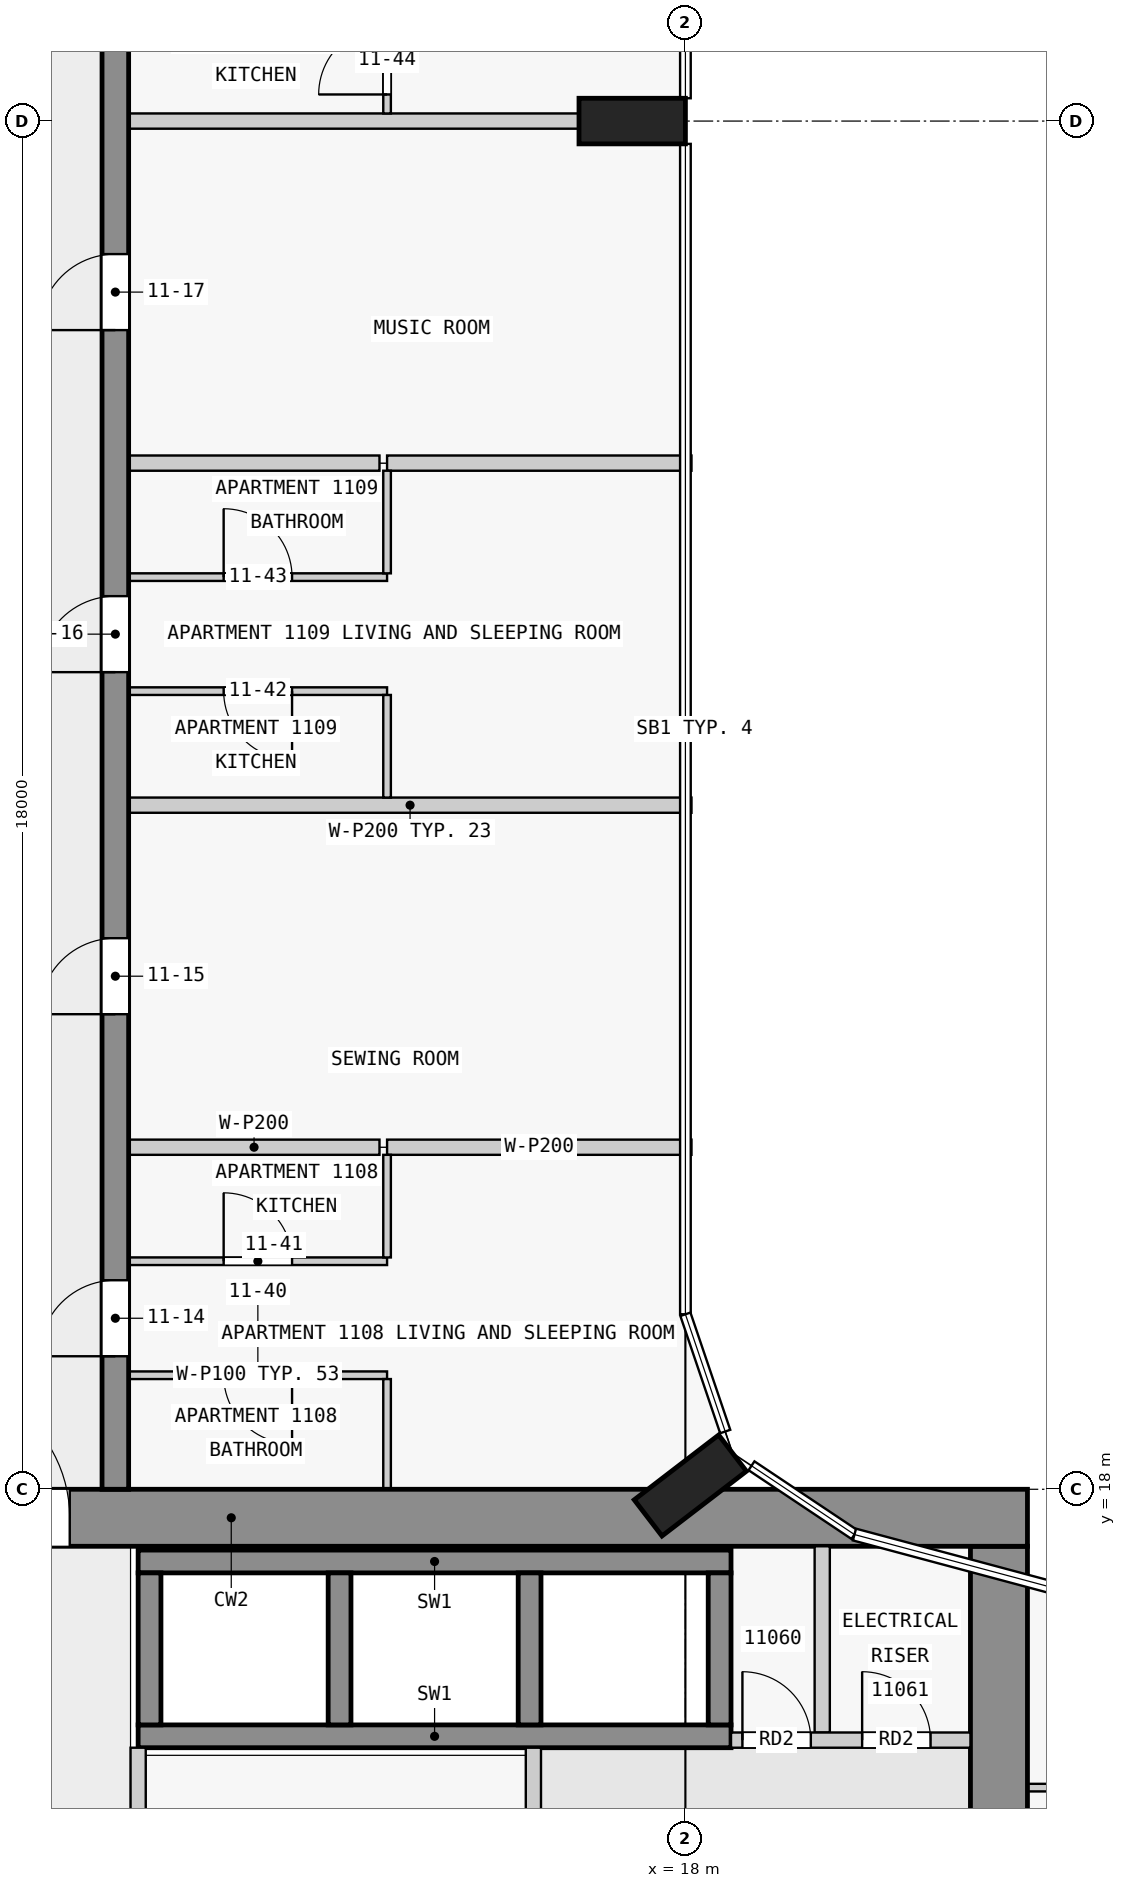
"""IFC4 building model, lengths in metres.
Left out: names, types, materials, properties, quantities, classifications, styles, units other than length and angle.
Written with IfcOpenShell. Run it as: python <this file> out.ifc"""

import sys

from ifc_helpers import new_model, si_unit, direction, frame, frame_2d, origin, origin_2d, place, context, subcontext, project, spatial, rectangle, extrude, element, fill, save


model = new_model("IFC4")
c1 = context("Model", 3, precision=1e-05, world=origin(), true_north=direction((0.0, 1.0)))
c2 = subcontext(c1, "Body", "Model", "MODEL_VIEW")
j1 = project(units=[si_unit("LENGTHUNIT", "METRE"), si_unit("PLANEANGLEUNIT", "RADIAN")], contexts=[c1])
p1 = place(None, origin())
s1 = spatial("IfcSite", under=j1, at=p1, CompositionType="ELEMENT")
p2 = place(p1, origin())
s2 = spatial("IfcBuilding", under=s1, at=p2, CompositionType="ELEMENT")
p3 = place(p2, frame((0.0, 0.0, 47.8)))
s3 = spatial("IfcBuildingStorey", under=s2, at=p3, CompositionType="ELEMENT", Elevation=47.8)
for number, where, z_axis, x_axis in (
    (1, (18.065, 18.05, 0.0), (0.0, 0.0, 1.0), (-0.609, 0.793, 0.0)),
    (2, (17.3, 36.0, 0.0), (0.0, 0.0, 1.0), (0.0, 1.0, 0.0)),
):
    element("IfcColumn", number, at=place(p3, frame(where, z_axis=z_axis, x_axis=x_axis)), inside=s3, PredefinedType="COLUMN", context=c2, shape_type="SweptSolid", body=[
        extrude(rectangle(XDim=0.6, YDim=1.4, at=origin_2d()), origin(), (0.0, 0.0, 1.0), 3.5),
    ])
p4 = place(p3, frame((1.55, 17.625, 0.0), z_axis=(0.0, 0.0, 1.0), x_axis=(1.0, 0.0, 0.0)))
e3 = element("IfcWall", 3, at=p4, inside=s3, PredefinedType="SHEAR", context=c2, shape_type="SweptSolid", body=[
    extrude(rectangle(XDim=20.95, YDim=0.75, at=frame_2d((10.475, 0.0))), origin(), (0.0, 0.0, 1.0), 3.25),
])
p5 = place(p4, frame((6.55, 0.0, 0.0)))
e4 = element("IfcOpeningElement", 4, at=p5, cuts=e3, PredefinedType="OPENING", context=c2, shape_type="SweptSolid", body=[
    extrude(rectangle(XDim=1.8, YDim=2.1, at=frame_2d((0.9, 1.05))), frame((0.0, 0.385, 0.0), z_axis=(0.0, -1.0, 0.0), x_axis=(1.0, 0.0, 0.0)), (0.0, 0.0, 1.0), 0.77),
])
p6 = place(p3, frame((22.125, 2.5, 0.0), z_axis=(0.0, 0.0, 1.0), x_axis=(0.0, 1.0, 0.0)))
e5 = element("IfcWall", 5, at=p6, inside=s3, PredefinedType="SHEAR", context=c2, shape_type="SweptSolid", body=[
    extrude(rectangle(XDim=14.75, YDim=0.75, at=frame_2d((7.375, 0.0))), origin(), (0.0, 0.0, 1.0), 3.25),
])
p7 = place(p6, frame((5.6, 0.0, 0.0)))
e6 = element("IfcOpeningElement", 6, at=p7, cuts=e5, PredefinedType="OPENING", context=c2, shape_type="SweptSolid", body=[
    extrude(rectangle(XDim=1.8, YDim=2.1, at=frame_2d((0.9, 1.05))), frame((0.0, 0.385, 0.0), z_axis=(0.0, -1.0, 0.0), x_axis=(1.0, 0.0, 0.0)), (0.0, 0.0, 1.0), 0.77),
])
for number, where, z_axis, x_axis in (
    (7, (10.8, 17.05, 0.0), (0.0, 0.0, 1.0), (1.0, 0.0, 0.0)),
    (8, (10.8, 14.75, 0.0), (0.0, 0.0, 1.0), (1.0, 0.0, 0.0)),
):
    element("IfcWall", number, at=place(p3, frame(where, z_axis=z_axis, x_axis=x_axis)), inside=s3, PredefinedType="SHEAR", context=c2, shape_type="SweptSolid", body=[
        extrude(rectangle(XDim=7.8, YDim=0.3, at=frame_2d((3.9, 0.0))), origin(), (0.0, 0.0, 1.0), 3.25),
    ])
for number, where, z_axis, x_axis in (
    (9, (10.95, 14.9, 0.0), (0.0, 0.0, 1.0), (0.0, 1.0, 0.0)),
    (10, (13.45, 14.9, 0.0), (0.0, 0.0, 1.0), (0.0, 1.0, 0.0)),
    (11, (15.95, 14.9, 0.0), (0.0, 0.0, 1.0), (0.0, 1.0, 0.0)),
    (12, (18.45, 14.9, 0.0), (0.0, 0.0, 1.0), (0.0, 1.0, 0.0)),
):
    element("IfcWall", number, at=place(p3, frame(where, z_axis=z_axis, x_axis=x_axis)), inside=s3, PredefinedType="SHEAR", context=c2, shape_type="SweptSolid", body=[
        extrude(rectangle(XDim=2.0, YDim=0.3, at=frame_2d((1.0, 0.0))), origin(), (0.0, 0.0, 1.0), 3.25),
    ])
p8 = place(p3, frame((10.5, 18.0, 0.0), z_axis=(0.0, 0.0, 1.0), x_axis=(0.0, 1.0, 0.0)))
e13 = element("IfcWall", 13, at=p8, inside=s3, PredefinedType="SHEAR", context=c2, shape_type="SweptSolid", body=[
    extrude(rectangle(XDim=27.0, YDim=0.35, at=frame_2d((13.5, 0.0))), origin(), (0.0, 0.0, 1.0), 3.25),
])
p9 = place(p8, frame((1.75, 0.0, 0.0)))
e14 = element("IfcOpeningElement", 14, at=p9, cuts=e13, PredefinedType="OPENING", context=c2, shape_type="SweptSolid", body=[
    extrude(rectangle(XDim=1.0, YDim=2.1, at=frame_2d((0.5, 1.05))), frame((0.0, 0.185, 0.0), z_axis=(0.0, -1.0, 0.0), x_axis=(1.0, 0.0, 0.0)), (0.0, 0.0, 1.0), 0.37),
])
p10 = place(p8, frame((6.25, 0.0, 0.0)))
e15 = element("IfcOpeningElement", 15, at=p10, cuts=e13, PredefinedType="OPENING", context=c2, shape_type="SweptSolid", body=[
    extrude(rectangle(XDim=1.0, YDim=2.1, at=frame_2d((0.5, 1.05))), frame((0.0, 0.185, 0.0), z_axis=(0.0, -1.0, 0.0), x_axis=(1.0, 0.0, 0.0)), (0.0, 0.0, 1.0), 0.37),
])
p11 = place(p8, frame((10.75, 0.0, 0.0)))
e16 = element("IfcOpeningElement", 16, at=p11, cuts=e13, PredefinedType="OPENING", context=c2, shape_type="SweptSolid", body=[
    extrude(rectangle(XDim=1.0, YDim=2.1, at=frame_2d((0.5, 1.05))), frame((0.0, 0.185, 0.0), z_axis=(0.0, -1.0, 0.0), x_axis=(1.0, 0.0, 0.0)), (0.0, 0.0, 1.0), 0.37),
])
p12 = place(p8, frame((15.25, 0.0, 0.0)))
e17 = element("IfcOpeningElement", 17, at=p12, cuts=e13, PredefinedType="OPENING", context=c2, shape_type="SweptSolid", body=[
    extrude(rectangle(XDim=1.0, YDim=2.1, at=frame_2d((0.5, 1.05))), frame((0.0, 0.185, 0.0), z_axis=(0.0, -1.0, 0.0), x_axis=(1.0, 0.0, 0.0)), (0.0, 0.0, 1.0), 0.37),
])
p13 = place(p8, frame((21.35, 0.0, 0.0)))
e18 = element("IfcOpeningElement", 18, at=p13, cuts=e13, PredefinedType="OPENING", context=c2, shape_type="SweptSolid", body=[
    extrude(rectangle(XDim=1.0, YDim=2.1, at=frame_2d((0.5, 1.05))), frame((0.0, 0.185, 0.0), z_axis=(0.0, -1.0, 0.0), x_axis=(1.0, 0.0, 0.0)), (0.0, 0.0, 1.0), 0.37),
])
p14 = place(p3, frame((10.8, 8.4, 0.0), z_axis=(0.0, 0.0, 1.0), x_axis=(0.0, 1.0, 0.0)))
e19 = element("IfcWall", 19, at=p14, inside=s3, PredefinedType="PARTITIONING", context=c2, shape_type="SweptSolid", body=[
    extrude(rectangle(XDim=6.2, YDim=0.2, at=frame_2d((3.1, 0.0))), origin(), (0.0, 0.0, 1.0), 3.25),
])
p15 = place(p3, frame((16.0, 8.4, 0.0), z_axis=(0.0, 0.0, 1.0), x_axis=(0.0, 1.0, 0.0)))
e20 = element("IfcWall", 20, at=p15, inside=s3, PredefinedType="PARTITIONING", context=c2, shape_type="SweptSolid", body=[
    extrude(rectangle(XDim=6.2, YDim=0.2, at=frame_2d((3.1, 0.0))), origin(), (0.0, 0.0, 1.0), 3.25),
])
p16 = place(p15, frame((3.15, 0.0, 0.0)))
e21 = element("IfcOpeningElement", 21, at=p16, cuts=e20, PredefinedType="OPENING", context=c2, shape_type="SweptSolid", body=[
    extrude(rectangle(XDim=0.9, YDim=2.1, at=frame_2d((0.45, 1.05))), frame((0.0, 0.11, 0.0), z_axis=(0.0, -1.0, 0.0), x_axis=(1.0, 0.0, 0.0)), (0.0, 0.0, 1.0), 0.22),
])
p17 = place(p3, frame((18.6, 14.7, 0.0), z_axis=(0.0, 0.0, 1.0), x_axis=(1.0, 0.0, 0.0)))
e22 = element("IfcWall", 22, at=p17, inside=s3, PredefinedType="PARTITIONING", context=c2, shape_type="SweptSolid", body=[
    extrude(rectangle(XDim=3.15, YDim=0.2, at=frame_2d((1.575, 0.0))), origin(), (0.0, 0.0, 1.0), 3.25),
])
p18 = place(p17, frame((0.15, 0.0, 0.0)))
e23 = element("IfcOpeningElement", 23, at=p18, cuts=e22, PredefinedType="OPENING", context=c2, shape_type="SweptSolid", body=[
    extrude(rectangle(XDim=0.9, YDim=2.1, at=frame_2d((0.45, 1.05))), frame((0.0, 0.11, 0.0), z_axis=(0.0, -1.0, 0.0), x_axis=(1.0, 0.0, 0.0)), (0.0, 0.0, 1.0), 0.22),
])
p19 = place(p17, frame((1.725, 0.0, 0.0)))
e24 = element("IfcOpeningElement", 24, at=p19, cuts=e22, PredefinedType="OPENING", context=c2, shape_type="SweptSolid", body=[
    extrude(rectangle(XDim=0.9, YDim=2.1, at=frame_2d((0.45, 1.05))), frame((0.0, 0.11, 0.0), z_axis=(0.0, -1.0, 0.0), x_axis=(1.0, 0.0, 0.0)), (0.0, 0.0, 1.0), 0.22),
])
p20 = place(p3, frame((19.8, 14.8, 0.0), z_axis=(0.0, 0.0, 1.0), x_axis=(0.0, 1.0, 0.0)))
e25 = element("IfcWall", 25, at=p20, inside=s3, PredefinedType="PARTITIONING", context=c2, shape_type="SweptSolid", body=[
    extrude(rectangle(XDim=2.45, YDim=0.2, at=frame_2d((1.225, 0.0))), origin(), (0.0, 0.0, 1.0), 3.25),
])
p21 = place(p3, frame((23.95, 14.075, 0.0), z_axis=(0.0, 0.0, 1.0), x_axis=(-1.0, 0.0, 0.0)))
e26 = element("IfcWall", 26, at=p21, inside=s3, PredefinedType="PARTITIONING", context=c2, shape_type="SweptSolid", body=[
    extrude(rectangle(XDim=1.45, YDim=0.1, at=frame_2d((0.725, 0.0))), origin(), (0.0, 0.0, 1.0), 3.25),
])
p22 = place(p3, frame((14.075, 19.5, 0.0), z_axis=(0.0, 0.0, 1.0), x_axis=(-1.0, 0.0, 0.0)))
e27 = element("IfcWall", 27, at=p22, inside=s3, PredefinedType="PARTITIONING", context=c2, shape_type="SweptSolid", body=[
    extrude(rectangle(XDim=3.4, YDim=0.1, at=frame_2d((1.7, 0.0))), origin(), (0.0, 0.0, 1.0), 3.25),
])
p23 = place(p22, frame((1.25, 0.0, 0.0)))
e28 = element("IfcOpeningElement", 28, at=p23, cuts=e27, PredefinedType="OPENING", context=c2, shape_type="SweptSolid", body=[
    extrude(rectangle(XDim=0.9, YDim=2.1, at=frame_2d((0.45, 1.05))), frame((0.0, 0.06, 0.0), z_axis=(0.0, -1.0, 0.0), x_axis=(1.0, 0.0, 0.0)), (0.0, 0.0, 1.0), 0.12),
])
p24 = place(p3, frame((10.675, 21.0, 0.0), z_axis=(0.0, 0.0, 1.0), x_axis=(1.0, 0.0, 0.0)))
e29 = element("IfcWall", 29, at=p24, inside=s3, PredefinedType="PARTITIONING", context=c2, shape_type="SweptSolid", body=[
    extrude(rectangle(XDim=3.4, YDim=0.1, at=frame_2d((1.7, 0.0))), origin(), (0.0, 0.0, 1.0), 3.25),
])
p25 = place(p24, frame((1.25, 0.0, 0.0)))
e30 = element("IfcOpeningElement", 30, at=p25, cuts=e29, PredefinedType="OPENING", context=c2, shape_type="SweptSolid", body=[
    extrude(rectangle(XDim=0.9, YDim=2.1, at=frame_2d((0.45, 1.05))), frame((0.0, 0.06, 0.0), z_axis=(0.0, -1.0, 0.0), x_axis=(1.0, 0.0, 0.0)), (0.0, 0.0, 1.0), 0.12),
])
p26 = place(p3, frame((13.975, 22.5, 0.0), z_axis=(0.0, 0.0, 1.0), x_axis=(-1.0, 0.0, 0.0)))
e31 = element("IfcWall", 31, at=p26, inside=s3, PredefinedType="PARTITIONING", context=c2, shape_type="SweptSolid", body=[
    extrude(rectangle(XDim=3.3, YDim=0.2, at=frame_2d((1.65, 0.0))), origin(), (0.0, 0.0, 1.0), 3.25),
])
p27 = place(p3, frame((14.075, 22.5, 0.0), z_axis=(0.0, 0.0, 1.0), x_axis=(1.0, 0.0, 0.0)))
e32 = element("IfcWall", 32, at=p27, inside=s3, PredefinedType="PARTITIONING", context=c2, shape_type="SweptSolid", body=[
    extrude(rectangle(XDim=4.005, YDim=0.2, at=frame_2d((2.002, 0.0))), origin(), (0.0, 0.0, 1.0), 3.25),
])
p28 = place(p3, frame((18.08, 27.0, 0.0), z_axis=(0.0, 0.0, 1.0), x_axis=(-1.0, 0.0, 0.0)))
e33 = element("IfcWall", 33, at=p28, inside=s3, PredefinedType="PARTITIONING", context=c2, shape_type="SweptSolid", body=[
    extrude(rectangle(XDim=7.405, YDim=0.2, at=frame_2d((3.703, 0.0))), origin(), (0.0, 0.0, 1.0), 3.25),
])
p29 = place(p3, frame((14.075, 28.5, 0.0), z_axis=(0.0, 0.0, 1.0), x_axis=(-1.0, 0.0, 0.0)))
e34 = element("IfcWall", 34, at=p29, inside=s3, PredefinedType="PARTITIONING", context=c2, shape_type="SweptSolid", body=[
    extrude(rectangle(XDim=3.4, YDim=0.1, at=frame_2d((1.7, 0.0))), origin(), (0.0, 0.0, 1.0), 3.25),
])
p30 = place(p29, frame((1.25, 0.0, 0.0)))
e35 = element("IfcOpeningElement", 35, at=p30, cuts=e34, PredefinedType="OPENING", context=c2, shape_type="SweptSolid", body=[
    extrude(rectangle(XDim=0.9, YDim=2.1, at=frame_2d((0.45, 1.05))), frame((0.0, 0.06, 0.0), z_axis=(0.0, -1.0, 0.0), x_axis=(1.0, 0.0, 0.0)), (0.0, 0.0, 1.0), 0.12),
])
p31 = place(p3, frame((10.675, 30.0, 0.0), z_axis=(0.0, 0.0, 1.0), x_axis=(1.0, 0.0, 0.0)))
e36 = element("IfcWall", 36, at=p31, inside=s3, PredefinedType="PARTITIONING", context=c2, shape_type="SweptSolid", body=[
    extrude(rectangle(XDim=3.4, YDim=0.1, at=frame_2d((1.7, 0.0))), origin(), (0.0, 0.0, 1.0), 3.25),
])
p32 = place(p31, frame((1.25, 0.0, 0.0)))
e37 = element("IfcOpeningElement", 37, at=p32, cuts=e36, PredefinedType="OPENING", context=c2, shape_type="SweptSolid", body=[
    extrude(rectangle(XDim=0.9, YDim=2.1, at=frame_2d((0.45, 1.05))), frame((0.0, 0.06, 0.0), z_axis=(0.0, -1.0, 0.0), x_axis=(1.0, 0.0, 0.0)), (0.0, 0.0, 1.0), 0.12),
])
p33 = place(p3, frame((13.975, 31.5, 0.0), z_axis=(0.0, 0.0, 1.0), x_axis=(-1.0, 0.0, 0.0)))
e38 = element("IfcWall", 38, at=p33, inside=s3, PredefinedType="PARTITIONING", context=c2, shape_type="SweptSolid", body=[
    extrude(rectangle(XDim=3.3, YDim=0.2, at=frame_2d((1.65, 0.0))), origin(), (0.0, 0.0, 1.0), 3.25),
])
p34 = place(p3, frame((14.075, 31.5, 0.0), z_axis=(0.0, 0.0, 1.0), x_axis=(1.0, 0.0, 0.0)))
e39 = element("IfcWall", 39, at=p34, inside=s3, PredefinedType="PARTITIONING", context=c2, shape_type="SweptSolid", body=[
    extrude(rectangle(XDim=4.005, YDim=0.2, at=frame_2d((2.002, 0.0))), origin(), (0.0, 0.0, 1.0), 3.25),
])
p35 = place(p3, frame((16.6, 36.0, 0.0), z_axis=(0.0, 0.0, 1.0), x_axis=(-1.0, 0.0, 0.0)))
e40 = element("IfcWall", 40, at=p35, inside=s3, PredefinedType="PARTITIONING", context=c2, shape_type="SweptSolid", body=[
    extrude(rectangle(XDim=5.925, YDim=0.2, at=frame_2d((2.962, 0.0))), origin(), (0.0, 0.0, 1.0), 3.25),
])
p36 = place(p3, frame((14.075, 18.0, 0.0), z_axis=(0.0, 0.0, 1.0), x_axis=(0.0, 1.0, 0.0)))
e41 = element("IfcWall", 41, at=p36, inside=s3, PredefinedType="PARTITIONING", context=c2, shape_type="SweptSolid", body=[
    extrude(rectangle(XDim=1.45, YDim=0.1, at=frame_2d((0.725, 0.0))), origin(), (0.0, 0.0, 1.0), 3.25),
])
for number, where, z_axis, x_axis in (
    (42, (14.075, 21.05, 0.0), (0.0, 0.0, 1.0), (0.0, 1.0, 0.0)),
    (43, (14.075, 27.1, 0.0), (0.0, 0.0, 1.0), (0.0, 1.0, 0.0)),
    (44, (14.075, 30.05, 0.0), (0.0, 0.0, 1.0), (0.0, 1.0, 0.0)),
):
    element("IfcWall", number, at=place(p3, frame(where, z_axis=z_axis, x_axis=x_axis)), inside=s3, PredefinedType="PARTITIONING", context=c2, shape_type="SweptSolid", body=[
        extrude(rectangle(XDim=1.35, YDim=0.1, at=frame_2d((0.675, 0.0))), origin(), (0.0, 0.0, 1.0), 3.25),
    ])
p37 = place(p3, frame((14.075, 36.1, 0.0), z_axis=(0.0, 0.0, 1.0), x_axis=(0.0, 1.0, 0.0)))
e45 = element("IfcWall", 45, at=p37, inside=s3, PredefinedType="PARTITIONING", context=c2, shape_type="SweptSolid", body=[
    extrude(rectangle(XDim=1.45, YDim=0.1, at=frame_2d((0.725, 0.0))), origin(), (0.0, 0.0, 1.0), 3.25),
])
p38 = place(p37, frame((0.25, 0.0, 0.0)))
e46 = element("IfcOpeningElement", 46, at=p38, cuts=e45, PredefinedType="OPENING", context=c2, shape_type="SweptSolid", body=[
    extrude(rectangle(XDim=0.9, YDim=2.1, at=frame_2d((0.45, 1.05))), frame((0.0, 0.06, 0.0), z_axis=(0.0, -1.0, 0.0), x_axis=(1.0, 0.0, 0.0)), (0.0, 0.0, 1.0), 0.12),
])
p39 = place(p5, origin())
e47 = element("IfcDoor", 47, at=p39, inside=s3, OperationType="DOUBLE_DOOR_SINGLE_SWING", PredefinedType="DOOR", context=c2, shape_type="SweptSolid", body=[
    extrude(rectangle(XDim=1.8, YDim=2.1, at=frame_2d((0.9, 1.05))), frame((0.0, 0.025, 0.0), z_axis=(0.0, -1.0, 0.0), x_axis=(1.0, 0.0, 0.0)), (0.0, 0.0, 1.0), 0.05),
])
fill(e4, e47)
p40 = place(p18, origin())
e48 = element("IfcDoor", 48, at=p40, inside=s3, OperationType="SINGLE_SWING_LEFT", PredefinedType="DOOR", context=c2, shape_type="SweptSolid", body=[
    extrude(rectangle(XDim=0.9, YDim=2.1, at=frame_2d((0.45, 1.05))), frame((0.0, 0.025, 0.0), z_axis=(0.0, -1.0, 0.0), x_axis=(1.0, 0.0, 0.0)), (0.0, 0.0, 1.0), 0.05),
])
fill(e23, e48)
p41 = place(p19, origin())
e49 = element("IfcDoor", 49, at=p41, inside=s3, OperationType="SINGLE_SWING_LEFT", PredefinedType="DOOR", context=c2, shape_type="SweptSolid", body=[
    extrude(rectangle(XDim=0.9, YDim=2.1, at=frame_2d((0.45, 1.05))), frame((0.0, 0.025, 0.0), z_axis=(0.0, -1.0, 0.0), x_axis=(1.0, 0.0, 0.0)), (0.0, 0.0, 1.0), 0.05),
])
fill(e24, e49)
p42 = place(p9, origin())
e50 = element("IfcDoor", 50, at=p42, inside=s3, OperationType="SINGLE_SWING_LEFT", PredefinedType="DOOR", context=c2, shape_type="SweptSolid", body=[
    extrude(rectangle(XDim=1.0, YDim=2.1, at=frame_2d((0.5, 1.05))), frame((0.0, 0.025, 0.0), z_axis=(0.0, -1.0, 0.0), x_axis=(1.0, 0.0, 0.0)), (0.0, 0.0, 1.0), 0.05),
])
fill(e14, e50)
p43 = place(p10, origin())
e51 = element("IfcDoor", 51, at=p43, inside=s3, OperationType="SINGLE_SWING_LEFT", PredefinedType="DOOR", context=c2, shape_type="SweptSolid", body=[
    extrude(rectangle(XDim=1.0, YDim=2.1, at=frame_2d((0.5, 1.05))), frame((0.0, 0.025, 0.0), z_axis=(0.0, -1.0, 0.0), x_axis=(1.0, 0.0, 0.0)), (0.0, 0.0, 1.0), 0.05),
])
fill(e15, e51)
p44 = place(p11, origin())
e52 = element("IfcDoor", 52, at=p44, inside=s3, OperationType="SINGLE_SWING_LEFT", PredefinedType="DOOR", context=c2, shape_type="SweptSolid", body=[
    extrude(rectangle(XDim=1.0, YDim=2.1, at=frame_2d((0.5, 1.05))), frame((0.0, 0.025, 0.0), z_axis=(0.0, -1.0, 0.0), x_axis=(1.0, 0.0, 0.0)), (0.0, 0.0, 1.0), 0.05),
])
fill(e16, e52)
p45 = place(p12, origin())
e53 = element("IfcDoor", 53, at=p45, inside=s3, OperationType="SINGLE_SWING_RIGHT", PredefinedType="DOOR", context=c2, shape_type="SweptSolid", body=[
    extrude(rectangle(XDim=1.0, YDim=2.1, at=frame_2d((0.5, 1.05))), frame((0.0, 0.025, 0.0), z_axis=(0.0, -1.0, 0.0), x_axis=(1.0, 0.0, 0.0)), (0.0, 0.0, 1.0), 0.05),
])
fill(e17, e53)
p46 = place(p23, origin())
e54 = element("IfcDoor", 54, at=p46, inside=s3, OperationType="SINGLE_SWING_RIGHT", PredefinedType="DOOR", context=c2, shape_type="SweptSolid", body=[
    extrude(rectangle(XDim=0.9, YDim=2.1, at=frame_2d((0.45, 1.05))), frame((0.0, 0.025, 0.0), z_axis=(0.0, -1.0, 0.0), x_axis=(1.0, 0.0, 0.0)), (0.0, 0.0, 1.0), 0.05),
])
fill(e28, e54)
p47 = place(p25, origin())
e55 = element("IfcDoor", 55, at=p47, inside=s3, OperationType="SINGLE_SWING_RIGHT", PredefinedType="DOOR", context=c2, shape_type="SweptSolid", body=[
    extrude(rectangle(XDim=0.9, YDim=2.1, at=frame_2d((0.45, 1.05))), frame((0.0, 0.025, 0.0), z_axis=(0.0, -1.0, 0.0), x_axis=(1.0, 0.0, 0.0)), (0.0, 0.0, 1.0), 0.05),
])
fill(e30, e55)
p48 = place(p30, origin())
e56 = element("IfcDoor", 56, at=p48, inside=s3, OperationType="SINGLE_SWING_RIGHT", PredefinedType="DOOR", context=c2, shape_type="SweptSolid", body=[
    extrude(rectangle(XDim=0.9, YDim=2.1, at=frame_2d((0.45, 1.05))), frame((0.0, 0.025, 0.0), z_axis=(0.0, -1.0, 0.0), x_axis=(1.0, 0.0, 0.0)), (0.0, 0.0, 1.0), 0.05),
])
fill(e35, e56)
p49 = place(p32, origin())
e57 = element("IfcDoor", 57, at=p49, inside=s3, OperationType="SINGLE_SWING_RIGHT", PredefinedType="DOOR", context=c2, shape_type="SweptSolid", body=[
    extrude(rectangle(XDim=0.9, YDim=2.1, at=frame_2d((0.45, 1.05))), frame((0.0, 0.025, 0.0), z_axis=(0.0, -1.0, 0.0), x_axis=(1.0, 0.0, 0.0)), (0.0, 0.0, 1.0), 0.05),
])
fill(e37, e57)
p50 = place(p38, origin())
e58 = element("IfcDoor", 58, at=p50, inside=s3, OperationType="SINGLE_SWING_LEFT", PredefinedType="DOOR", context=c2, shape_type="SweptSolid", body=[
    extrude(rectangle(XDim=0.9, YDim=2.1, at=frame_2d((0.45, 1.05))), frame((0.0, 0.025, 0.0), z_axis=(0.0, -1.0, 0.0), x_axis=(1.0, 0.0, 0.0)), (0.0, 0.0, 1.0), 0.05),
])
fill(e46, e58)
save(model, sys.argv[1])
